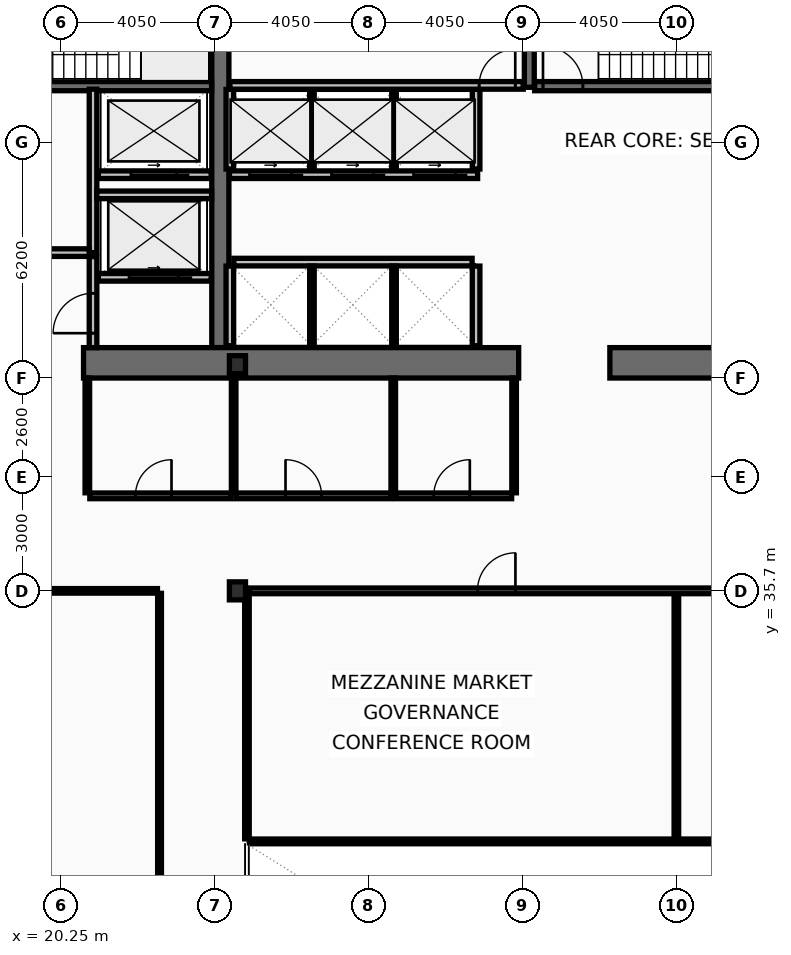
"""IFC4 building model, lengths in metres.
Left out: names, types, materials, properties, quantities, classifications, styles, units other than length and angle.
Written with IfcOpenShell. Run it as: python <this file> out.ifc"""

import sys

from ifc_helpers import new_model, si_unit, direction, frame, frame_2d, origin, origin_2d, place, context, subcontext, project, spatial, rectangle, i_section, extrude, element, fill, save


model = new_model("IFC4")
c1 = context("Model", 3, precision=1e-05, world=origin(), true_north=direction((0.0, 1.0)))
c2 = subcontext(c1, "Body", "Model", "MODEL_VIEW")
j1 = project(units=[si_unit("LENGTHUNIT", "METRE"), si_unit("PLANEANGLEUNIT", "RADIAN")], contexts=[c1])
p1 = place(None, origin())
s1 = spatial("IfcSite", under=j1, at=p1, CompositionType="ELEMENT")
p2 = place(p1, origin())
s2 = spatial("IfcBuilding", under=s1, at=p2, CompositionType="ELEMENT")
p3 = place(p2, frame((0.0, 0.0, 15.4)))
s3 = spatial("IfcBuildingStorey", under=s2, at=p3, CompositionType="ELEMENT", Elevation=15.4)
p4 = place(p3, frame((24.45, 42.1, 0.0), z_axis=(0.0, 0.0, 1.0), x_axis=(0.0, 1.0, 0.0)))
e1 = element("IfcWall", 1, at=p4, inside=s3, PredefinedType="SHEAR", context=c2, shape_type="SweptSolid", body=[
    extrude(rectangle(XDim=10.8, YDim=0.45, at=frame_2d((5.4, 0.0))), origin(), (0.0, 0.0, 1.0), 4.78),
])
p5 = place(p3, frame((32.3, 41.7, 0.0), z_axis=(0.0, 0.0, 1.0), x_axis=(-1.0, 0.0, 0.0)))
e2 = element("IfcWall", 2, at=p5, inside=s3, PredefinedType="SHEAR", context=c2, shape_type="SweptSolid", body=[
    extrude(rectangle(XDim=11.45, YDim=0.8, at=frame_2d((5.725, 0.0))), origin(), (0.0, 0.0, 1.0), 4.78),
])
p6 = place(p3, frame((38.45, 41.7, 0.0), z_axis=(0.0, 0.0, 1.0), x_axis=(-1.0, 0.0, 0.0)))
e3 = element("IfcWall", 3, at=p6, inside=s3, PredefinedType="SHEAR", context=c2, shape_type="SweptSolid", body=[
    extrude(rectangle(XDim=3.75, YDim=0.8, at=frame_2d((1.875, 0.0))), origin(), (0.0, 0.0, 1.0), 4.78),
])
p7 = place(p3, frame((32.58, 48.95, 0.0), z_axis=(0.0, 0.0, 1.0), x_axis=(0.0, 1.0, 0.0)))
e4 = element("IfcWall", 4, at=p7, inside=s3, PredefinedType="SHEAR", context=c2, shape_type="SweptSolid", body=[
    extrude(rectangle(XDim=3.95, YDim=0.26, at=frame_2d((1.975, 0.0))), origin(), (0.0, 0.0, 1.0), 4.78),
])
p8 = place(p3, frame((17.0, 48.98, 0.0), z_axis=(0.0, 0.0, 1.0), x_axis=(1.0, 0.0, 0.0)))
e5 = element("IfcWall", 5, at=p8, inside=s3, PredefinedType="SHEAR", context=c2, shape_type="SweptSolid", body=[
    extrude(rectangle(XDim=7.22, YDim=0.24, at=frame_2d((3.61, 0.0))), origin(), (0.0, 0.0, 1.0), 4.78),
])
p9 = place(p8, frame((0.22, 0.0, 0.0)))
e6 = element("IfcOpeningElement", 6, at=p9, cuts=e5, PredefinedType="OPENING", context=c2, shape_type="SweptSolid", body=[
    extrude(rectangle(XDim=1.05, YDim=2.15, at=frame_2d((0.525, 1.075))), frame((0.0, 0.13, 0.0), z_axis=(0.0, -1.0, 0.0), x_axis=(1.0, 0.0, 0.0)), (0.0, 0.0, 1.0), 0.26),
])
p10 = place(p3, frame((32.72, 48.98, 0.0), z_axis=(0.0, 0.0, 1.0), x_axis=(1.0, 0.0, 0.0)))
e7 = element("IfcWall", 7, at=p10, inside=s3, PredefinedType="SHEAR", context=c2, shape_type="SweptSolid", body=[
    extrude(rectangle(XDim=7.56, YDim=0.24, at=frame_2d((3.78, 0.0))), origin(), (0.0, 0.0, 1.0), 4.78),
])
p11 = place(p10, frame((0.22, 0.0, 0.0)))
e8 = element("IfcOpeningElement", 8, at=p11, cuts=e7, PredefinedType="OPENING", context=c2, shape_type="SweptSolid", body=[
    extrude(rectangle(XDim=1.05, YDim=2.15, at=frame_2d((0.525, 1.075))), frame((0.0, 0.13, 0.0), z_axis=(0.0, -1.0, 0.0), x_axis=(1.0, 0.0, 0.0)), (0.0, 0.0, 1.0), 0.26),
])
for number, where, z_axis, x_axis in (
    (9, (24.9, 35.7, 0.0), (0.0, 0.0, 1.0), (1.0, 0.0, 0.0)),
    (10, (24.9, 41.65, 0.0), (0.0, 0.0, 1.0), (1.0, 0.0, 0.0)),
):
    element("IfcColumn", number, at=place(p3, frame(where, z_axis=z_axis, x_axis=x_axis)), inside=s3, PredefinedType="COLUMN", context=c2, shape_type="SweptSolid", body=[
        extrude(i_section(OverallWidth=0.424, OverallDepth=0.474, WebThickness=0.048, FlangeThickness=0.077, at=origin_2d()), origin(), (0.0, 0.0, 1.0), 5.0),
    ])
p12 = place(p3, frame((24.21, 43.95, 0.0), z_axis=(0.0, 0.0, 1.0), x_axis=(-1.0, 0.0, 0.0)))
e11 = element("IfcWall", 11, at=p12, inside=s3, PredefinedType="PARTITIONING", context=c2, shape_type="SweptSolid", body=[
    extrude(rectangle(XDim=2.97, YDim=0.2, at=frame_2d((1.485, 0.0))), origin(), (0.0, 0.0, 1.0), 4.78),
])
p13 = place(p12, frame((0.86, 0.0, 0.0)))
e12 = element("IfcOpeningElement", 12, at=p13, cuts=e11, PredefinedType="OPENING", context=c2, shape_type="SweptSolid", body=[
    extrude(rectangle(XDim=1.3, YDim=2.18, at=frame_2d((0.65, 1.09))), frame((0.0, 0.11, 0.0), z_axis=(0.0, -1.0, 0.0), x_axis=(1.0, 0.0, 0.0)), (0.0, 0.0, 1.0), 0.22),
])
p14 = place(p3, frame((24.21, 46.65, 0.0), z_axis=(0.0, 0.0, 1.0), x_axis=(-1.0, 0.0, 0.0)))
e13 = element("IfcWall", 13, at=p14, inside=s3, PredefinedType="PARTITIONING", context=c2, shape_type="SweptSolid", body=[
    extrude(rectangle(XDim=2.97, YDim=0.2, at=frame_2d((1.485, 0.0))), origin(), (0.0, 0.0, 1.0), 4.78),
])
p15 = place(p14, frame((0.91, 0.0, 0.0)))
e14 = element("IfcOpeningElement", 14, at=p15, cuts=e13, PredefinedType="OPENING", context=c2, shape_type="SweptSolid", body=[
    extrude(rectangle(XDim=1.2, YDim=2.18, at=frame_2d((0.6, 1.09))), frame((0.0, 0.11, 0.0), z_axis=(0.0, -1.0, 0.0), x_axis=(1.0, 0.0, 0.0)), (0.0, 0.0, 1.0), 0.22),
])
p16 = place(p3, frame((31.22, 46.65, 0.0), z_axis=(0.0, 0.0, 1.0), x_axis=(-1.0, 0.0, 0.0)))
e15 = element("IfcWall", 15, at=p16, inside=s3, PredefinedType="PARTITIONING", context=c2, shape_type="SweptSolid", body=[
    extrude(rectangle(XDim=6.53, YDim=0.2, at=frame_2d((3.265, 0.0))), origin(), (0.0, 0.0, 1.0), 4.78),
])
p17 = place(p16, frame((4.9, 0.0, 0.0)))
e16 = element("IfcOpeningElement", 16, at=p17, cuts=e15, PredefinedType="OPENING", context=c2, shape_type="SweptSolid", body=[
    extrude(rectangle(XDim=1.1, YDim=2.18, at=frame_2d((0.55, 1.09))), frame((0.0, 0.11, 0.0), z_axis=(0.0, -1.0, 0.0), x_axis=(1.0, 0.0, 0.0)), (0.0, 0.0, 1.0), 0.22),
])
p18 = place(p16, frame((2.74, 0.0, 0.0)))
e17 = element("IfcOpeningElement", 17, at=p18, cuts=e15, PredefinedType="OPENING", context=c2, shape_type="SweptSolid", body=[
    extrude(rectangle(XDim=1.1, YDim=2.18, at=frame_2d((0.55, 1.09))), frame((0.0, 0.11, 0.0), z_axis=(0.0, -1.0, 0.0), x_axis=(1.0, 0.0, 0.0)), (0.0, 0.0, 1.0), 0.22),
])
p19 = place(p16, frame((0.58, 0.0, 0.0)))
e18 = element("IfcOpeningElement", 18, at=p19, cuts=e15, PredefinedType="OPENING", context=c2, shape_type="SweptSolid", body=[
    extrude(rectangle(XDim=1.1, YDim=2.18, at=frame_2d((0.55, 1.09))), frame((0.0, 0.11, 0.0), z_axis=(0.0, -1.0, 0.0), x_axis=(1.0, 0.0, 0.0)), (0.0, 0.0, 1.0), 0.22),
])
p20 = place(p3, frame((21.1, 44.6, 0.0), z_axis=(0.0, 0.0, 1.0), x_axis=(0.0, 1.0, 0.0)))
e19 = element("IfcWall", 19, at=p20, inside=s3, PredefinedType="PARTITIONING", context=c2, shape_type="SweptSolid", body=[
    extrude(rectangle(XDim=4.3, YDim=0.2, at=frame_2d((2.15, 0.0))), origin(), (0.0, 0.0, 1.0), 4.78),
])
p21 = place(p3, frame((17.0, 44.6, 0.0), z_axis=(0.0, 0.0, 1.0), x_axis=(1.0, 0.0, 0.0)))
e20 = element("IfcWall", 20, at=p21, inside=s3, PredefinedType="PARTITIONING", context=c2, shape_type="SweptSolid", body=[
    extrude(rectangle(XDim=4.0, YDim=0.2, at=frame_2d((2.0, 0.0))), origin(), (0.0, 0.0, 1.0), 4.78),
])
p22 = place(p21, frame((1.25, 0.0, 0.0)))
e21 = element("IfcOpeningElement", 21, at=p22, cuts=e20, PredefinedType="OPENING", context=c2, shape_type="SweptSolid", body=[
    extrude(rectangle(XDim=1.05, YDim=2.15, at=frame_2d((0.525, 1.075))), frame((0.0, 0.11, 0.0), z_axis=(0.0, -1.0, 0.0), x_axis=(1.0, 0.0, 0.0)), (0.0, 0.0, 1.0), 0.22),
])
p23 = place(p3, frame((21.2, 46.12, 0.0), z_axis=(0.0, 0.0, 1.0), x_axis=(1.0, 0.0, 0.0)))
e22 = element("IfcWall", 22, at=p23, inside=s3, PredefinedType="PARTITIONING", context=c2, shape_type="SweptSolid", body=[
    extrude(rectangle(XDim=3.02, YDim=0.2, at=frame_2d((1.51, 0.0))), origin(), (0.0, 0.0, 1.0), 4.78),
])
p24 = place(p3, frame((21.1, 42.1, 0.0), z_axis=(0.0, 0.0, 1.0), x_axis=(0.0, 1.0, 0.0)))
e23 = element("IfcWall", 23, at=p24, inside=s3, PredefinedType="PARTITIONING", context=c2, shape_type="SweptSolid", body=[
    extrude(rectangle(XDim=2.395, YDim=0.2, at=frame_2d((1.198, 0.0))), origin(), (0.0, 0.0, 1.0), 4.78),
])
p25 = place(p24, frame((0.38, 0.0, 0.0)))
e24 = element("IfcOpeningElement", 24, at=p25, cuts=e23, PredefinedType="OPENING", context=c2, shape_type="SweptSolid", body=[
    extrude(rectangle(XDim=1.05, YDim=2.15, at=frame_2d((0.525, 1.075))), frame((0.0, 0.11, 0.0), z_axis=(0.0, -1.0, 0.0), x_axis=(1.0, 0.0, 0.0)), (0.0, 0.0, 1.0), 0.22),
])
for number, where, z_axis, x_axis in (
    (25, (24.7, 46.8, 0.0), (0.0, 0.0, 1.0), (0.0, 1.0, 0.0)),
    (26, (31.18, 46.8, 0.0), (0.0, 0.0, 1.0), (0.0, 1.0, 0.0)),
):
    element("IfcWall", number, at=place(p3, frame(where, z_axis=z_axis, x_axis=x_axis)), inside=s3, PredefinedType="PARTITIONING", context=c2, shape_type="SweptSolid", body=[
        extrude(rectangle(XDim=2.095, YDim=0.2, at=frame_2d((1.047, 0.0))), origin(), (0.0, 0.0, 1.0), 4.78),
    ])
for number, where, z_axis, x_axis in (
    (27, (26.86, 46.8, 0.0), (0.0, 0.0, 1.0), (0.0, 1.0, 0.0)),
    (28, (29.02, 46.8, 0.0), (0.0, 0.0, 1.0), (0.0, 1.0, 0.0)),
):
    element("IfcWall", number, at=place(p3, frame(where, z_axis=z_axis, x_axis=x_axis)), inside=s3, PredefinedType="PARTITIONING", context=c2, shape_type="SweptSolid", body=[
        extrude(rectangle(XDim=2.095, YDim=0.12, at=frame_2d((1.047, 0.0))), origin(), (0.0, 0.0, 1.0), 4.78),
    ])
p26 = place(p3, frame((24.805, 44.35, 0.0), z_axis=(0.0, 0.0, 1.0), x_axis=(1.0, 0.0, 0.0)))
e29 = element("IfcWall", 29, at=p26, inside=s3, PredefinedType="PARTITIONING", context=c2, shape_type="SweptSolid", body=[
    extrude(rectangle(XDim=6.27, YDim=0.2, at=frame_2d((3.135, 0.0))), origin(), (0.0, 0.0, 1.0), 4.78),
])
for number, where, z_axis, x_axis in (
    (30, (24.7, 42.15, 0.0), (0.0, 0.0, 1.0), (0.0, 1.0, 0.0)),
    (31, (31.18, 42.15, 0.0), (0.0, 0.0, 1.0), (0.0, 1.0, 0.0)),
):
    element("IfcWall", number, at=place(p3, frame(where, z_axis=z_axis, x_axis=x_axis)), inside=s3, PredefinedType="PARTITIONING", context=c2, shape_type="SweptSolid", body=[
        extrude(rectangle(XDim=2.095, YDim=0.2, at=frame_2d((1.048, 0.0))), origin(), (0.0, 0.0, 1.0), 4.78),
    ])
for number, where, z_axis, x_axis in (
    (32, (26.86, 42.15, 0.0), (0.0, 0.0, 1.0), (0.0, 1.0, 0.0)),
    (33, (29.02, 42.15, 0.0), (0.0, 0.0, 1.0), (0.0, 1.0, 0.0)),
):
    element("IfcWall", number, at=place(p3, frame(where, z_axis=z_axis, x_axis=x_axis)), inside=s3, PredefinedType="PARTITIONING", context=c2, shape_type="SweptSolid", body=[
        extrude(rectangle(XDim=2.095, YDim=0.12, at=frame_2d((1.048, 0.0))), origin(), (0.0, 0.0, 1.0), 4.78),
    ])
p27 = place(p3, frame((24.7, 49.0, 0.0), z_axis=(0.0, 0.0, 1.0), x_axis=(1.0, 0.0, 0.0)))
e34 = element("IfcWall", 34, at=p27, inside=s3, PredefinedType="PARTITIONING", context=c2, shape_type="SweptSolid", body=[
    extrude(rectangle(XDim=7.72, YDim=0.2, at=frame_2d((3.86, 0.0))), origin(), (0.0, 0.0, 1.0), 4.78),
])
p28 = place(p27, frame((6.56, 0.0, 0.0)))
e35 = element("IfcOpeningElement", 35, at=p28, cuts=e34, PredefinedType="OPENING", context=c2, shape_type="SweptSolid", body=[
    extrude(rectangle(XDim=0.95, YDim=2.1, at=frame_2d((0.475, 1.05))), frame((0.0, 0.11, 0.0), z_axis=(0.0, -1.0, 0.0), x_axis=(1.0, 0.0, 0.0)), (0.0, 0.0, 1.0), 0.22),
])
p29 = place(p3, frame((25.215, 29.12, 0.0), z_axis=(0.0, 0.0, 1.0), x_axis=(1.0, 0.0, 0.0)))
e36 = element("IfcWall", 36, at=p29, inside=s3, PredefinedType="MOVABLE", context=c2, shape_type="SweptSolid", body=[
    extrude(rectangle(XDim=22.47, YDim=0.1, at=frame_2d((11.235, 0.0))), origin(), (0.0, 0.0, 1.0), 3.87),
])
p30 = place(p3, frame((36.45, 29.175, 0.0), z_axis=(0.0, 0.0, 1.0), x_axis=(0.0, 1.0, 0.0)))
e37 = element("IfcWall", 37, at=p30, inside=s3, PredefinedType="PARTITIONING", context=c2, shape_type="SweptSolid", body=[
    extrude(rectangle(XDim=6.445, YDim=0.12, at=frame_2d((3.223, 0.0))), origin(), (0.0, 0.0, 1.0), 4.17),
])
p31 = place(p3, frame((25.215, 35.7, 0.0), z_axis=(0.0, 0.0, 1.0), x_axis=(1.0, 0.0, 0.0)))
e38 = element("IfcWall", 38, at=p31, inside=s3, PredefinedType="PARTITIONING", context=c2, shape_type="SweptSolid", body=[
    extrude(rectangle(XDim=22.47, YDim=0.15, at=frame_2d((11.235, 0.0))), origin(), (0.0, 0.0, 1.0), 3.87),
])
p32 = place(p31, frame((6.0, 0.0, 0.0)))
e39 = element("IfcOpeningElement", 39, at=p32, cuts=e38, PredefinedType="OPENING", context=c2, shape_type="SweptSolid", body=[
    extrude(rectangle(XDim=1.0, YDim=2.05, at=frame_2d((0.5, 1.025))), frame((0.0, 0.085, 0.0), z_axis=(0.0, -1.0, 0.0), x_axis=(1.0, 0.0, 0.0)), (0.0, 0.0, 1.0), 0.17),
])
p33 = place(p31, frame((18.5, 0.0, 0.0)))
e40 = element("IfcOpeningElement", 40, at=p33, cuts=e38, PredefinedType="OPENING", context=c2, shape_type="SweptSolid", body=[
    extrude(rectangle(XDim=1.0, YDim=2.05, at=frame_2d((0.5, 1.025))), frame((0.0, 0.085, 0.0), z_axis=(0.0, -1.0, 0.0), x_axis=(1.0, 0.0, 0.0)), (0.0, 0.0, 1.0), 0.17),
])
p34 = place(p3, frame((25.15, 29.175, 0.0), z_axis=(0.0, 0.0, 1.0), x_axis=(0.0, 1.0, 0.0)))
e41 = element("IfcWall", 41, at=p34, inside=s3, PredefinedType="PARTITIONING", context=c2, shape_type="SweptSolid", body=[
    extrude(rectangle(XDim=6.445, YDim=0.12, at=frame_2d((3.223, 0.0))), origin(), (0.0, 0.0, 1.0), 3.87),
])
p35 = place(p3, frame((21.015, 38.2, 0.0), z_axis=(0.0, 0.0, 1.0), x_axis=(1.0, 0.0, 0.0)))
e42 = element("IfcWall", 42, at=p35, inside=s3, PredefinedType="PARTITIONING", context=c2, shape_type="SweptSolid", body=[
    extrude(rectangle(XDim=3.72, YDim=0.15, at=frame_2d((1.86, 0.0))), origin(), (0.0, 0.0, 1.0), 3.87),
])
p36 = place(p35, frame((1.2, 0.0, 0.0)))
e43 = element("IfcOpeningElement", 43, at=p36, cuts=e42, PredefinedType="OPENING", context=c2, shape_type="SweptSolid", body=[
    extrude(rectangle(XDim=0.95, YDim=2.05, at=frame_2d((0.475, 1.025))), frame((0.0, 0.085, 0.0), z_axis=(0.0, -1.0, 0.0), x_axis=(1.0, 0.0, 0.0)), (0.0, 0.0, 1.0), 0.17),
])
p37 = place(p3, frame((24.865, 38.2, 0.0), z_axis=(0.0, 0.0, 1.0), x_axis=(1.0, 0.0, 0.0)))
e44 = element("IfcWall", 44, at=p37, inside=s3, PredefinedType="PARTITIONING", context=c2, shape_type="SweptSolid", body=[
    extrude(rectangle(XDim=4.07, YDim=0.15, at=frame_2d((2.035, 0.0))), origin(), (0.0, 0.0, 1.0), 3.87),
])
p38 = place(p37, frame((1.3, 0.0, 0.0)))
e45 = element("IfcOpeningElement", 45, at=p38, cuts=e44, PredefinedType="OPENING", context=c2, shape_type="SweptSolid", body=[
    extrude(rectangle(XDim=0.95, YDim=2.05, at=frame_2d((0.475, 1.025))), frame((0.0, 0.085, 0.0), z_axis=(0.0, -1.0, 0.0), x_axis=(1.0, 0.0, 0.0)), (0.0, 0.0, 1.0), 0.17),
])
p39 = place(p3, frame((29.065, 38.2, 0.0), z_axis=(0.0, 0.0, 1.0), x_axis=(1.0, 0.0, 0.0)))
e46 = element("IfcWall", 46, at=p39, inside=s3, PredefinedType="PARTITIONING", context=c2, shape_type="SweptSolid", body=[
    extrude(rectangle(XDim=3.05, YDim=0.15, at=frame_2d((1.525, 0.0))), origin(), (0.0, 0.0, 1.0), 3.87),
])
p40 = place(p39, frame((1.0, 0.0, 0.0)))
e47 = element("IfcOpeningElement", 47, at=p40, cuts=e46, PredefinedType="OPENING", context=c2, shape_type="SweptSolid", body=[
    extrude(rectangle(XDim=0.95, YDim=2.05, at=frame_2d((0.475, 1.025))), frame((0.0, 0.085, 0.0), z_axis=(0.0, -1.0, 0.0), x_axis=(1.0, 0.0, 0.0)), (0.0, 0.0, 1.0), 0.17),
])
p41 = place(p3, frame((20.95, 38.28, 0.0), z_axis=(0.0, 0.0, 1.0), x_axis=(0.0, 1.0, 0.0)))
e48 = element("IfcWall", 48, at=p41, inside=s3, PredefinedType="PARTITIONING", context=c2, shape_type="SweptSolid", body=[
    extrude(rectangle(XDim=3.02, YDim=0.12, at=frame_2d((1.51, 0.0))), origin(), (0.0, 0.0, 1.0), 4.78),
])
p42 = place(p3, frame((24.8, 38.28, 0.0), z_axis=(0.0, 0.0, 1.0), x_axis=(0.0, 1.0, 0.0)))
e49 = element("IfcWall", 49, at=p42, inside=s3, PredefinedType="PARTITIONING", context=c2, shape_type="SweptSolid", body=[
    extrude(rectangle(XDim=3.02, YDim=0.12, at=frame_2d((1.51, 0.0))), origin(), (0.0, 0.0, 1.0), 3.87),
])
for number, where, z_axis, x_axis in (
    (50, (29.0, 38.28, 0.0), (0.0, 0.0, 1.0), (0.0, 1.0, 0.0)),
    (51, (32.18, 38.28, 0.0), (0.0, 0.0, 1.0), (0.0, 1.0, 0.0)),
):
    element("IfcWall", number, at=place(p3, frame(where, z_axis=z_axis, x_axis=x_axis)), inside=s3, PredefinedType="PARTITIONING", context=c2, shape_type="SweptSolid", body=[
        extrude(rectangle(XDim=3.02, YDim=0.12, at=frame_2d((1.51, 0.0))), origin(), (0.0, 0.0, 1.0), 4.78),
    ])
p43 = place(p3, frame((22.85, 14.965, 0.0), z_axis=(0.0, 0.0, 1.0), x_axis=(0.0, 1.0, 0.0)))
e52 = element("IfcWall", 52, at=p43, inside=s3, PredefinedType="MOVABLE", context=c2, shape_type="SweptSolid", body=[
    extrude(rectangle(XDim=20.67, YDim=0.1, at=frame_2d((10.335, 0.0))), origin(), (0.0, 0.0, 1.0), 4.17),
])
p44 = place(p43, frame((6.5, 0.0, 0.0)))
e53 = element("IfcOpeningElement", 53, at=p44, cuts=e52, PredefinedType="OPENING", context=c2, shape_type="SweptSolid", body=[
    extrude(rectangle(XDim=1.0, YDim=2.05, at=frame_2d((0.5, 1.025))), frame((0.0, 0.06, 0.0), z_axis=(0.0, -1.0, 0.0), x_axis=(1.0, 0.0, 0.0)), (0.0, 0.0, 1.0), 0.12),
])
p45 = place(p3, frame((16.24, 35.7, 0.0), z_axis=(0.0, 0.0, 1.0), x_axis=(1.0, 0.0, 0.0)))
e54 = element("IfcWall", 54, at=p45, inside=s3, PredefinedType="PARTITIONING", context=c2, shape_type="SweptSolid", body=[
    extrude(rectangle(XDim=6.555, YDim=0.12, at=frame_2d((3.277, 0.0))), origin(), (0.0, 0.0, 1.0), 3.87),
])
p46 = place(p11, origin())
e55 = element("IfcDoor", 55, at=p46, inside=s3, OperationType="SINGLE_SWING_LEFT", PredefinedType="DOOR", context=c2, shape_type="SweptSolid", body=[
    extrude(rectangle(XDim=1.05, YDim=2.15, at=frame_2d((0.525, 1.075))), frame((0.0, 0.025, 0.0), z_axis=(0.0, -1.0, 0.0), x_axis=(1.0, 0.0, 0.0)), (0.0, 0.0, 1.0), 0.05),
])
fill(e8, e55)
p47 = place(p13, origin())
e56 = element("IfcDoor", 56, at=p47, inside=s3, OperationType="SLIDING_TO_LEFT", PredefinedType="DOOR", context=c2, shape_type="SweptSolid", body=[
    extrude(rectangle(XDim=1.3, YDim=2.18, at=frame_2d((0.65, 1.09))), frame((0.0, 0.025, 0.0), z_axis=(0.0, -1.0, 0.0), x_axis=(1.0, 0.0, 0.0)), (0.0, 0.0, 1.0), 0.05),
])
fill(e12, e56)
p48 = place(p15, origin())
e57 = element("IfcDoor", 57, at=p48, inside=s3, OperationType="SLIDING_TO_LEFT", PredefinedType="DOOR", context=c2, shape_type="SweptSolid", body=[
    extrude(rectangle(XDim=1.2, YDim=2.18, at=frame_2d((0.6, 1.09))), frame((0.0, 0.025, 0.0), z_axis=(0.0, -1.0, 0.0), x_axis=(1.0, 0.0, 0.0)), (0.0, 0.0, 1.0), 0.05),
])
fill(e14, e57)
p49 = place(p17, origin())
e58 = element("IfcDoor", 58, at=p49, inside=s3, OperationType="SLIDING_TO_LEFT", PredefinedType="DOOR", context=c2, shape_type="SweptSolid", body=[
    extrude(rectangle(XDim=1.1, YDim=2.18, at=frame_2d((0.55, 1.09))), frame((0.0, 0.025, 0.0), z_axis=(0.0, -1.0, 0.0), x_axis=(1.0, 0.0, 0.0)), (0.0, 0.0, 1.0), 0.05),
])
fill(e16, e58)
p50 = place(p18, origin())
e59 = element("IfcDoor", 59, at=p50, inside=s3, OperationType="SLIDING_TO_LEFT", PredefinedType="DOOR", context=c2, shape_type="SweptSolid", body=[
    extrude(rectangle(XDim=1.1, YDim=2.18, at=frame_2d((0.55, 1.09))), frame((0.0, 0.025, 0.0), z_axis=(0.0, -1.0, 0.0), x_axis=(1.0, 0.0, 0.0)), (0.0, 0.0, 1.0), 0.05),
])
fill(e17, e59)
p51 = place(p19, origin())
e60 = element("IfcDoor", 60, at=p51, inside=s3, OperationType="SLIDING_TO_LEFT", PredefinedType="DOOR", context=c2, shape_type="SweptSolid", body=[
    extrude(rectangle(XDim=1.1, YDim=2.18, at=frame_2d((0.55, 1.09))), frame((0.0, 0.025, 0.0), z_axis=(0.0, -1.0, 0.0), x_axis=(1.0, 0.0, 0.0)), (0.0, 0.0, 1.0), 0.05),
])
fill(e18, e60)
p52 = place(p25, origin())
e61 = element("IfcDoor", 61, at=p52, inside=s3, OperationType="SINGLE_SWING_LEFT", PredefinedType="DOOR", context=c2, shape_type="SweptSolid", body=[
    extrude(rectangle(XDim=1.05, YDim=2.15, at=frame_2d((0.525, 1.075))), frame((0.0, 0.025, 0.0), z_axis=(0.0, -1.0, 0.0), x_axis=(1.0, 0.0, 0.0)), (0.0, 0.0, 1.0), 0.05),
])
fill(e24, e61)
p53 = place(p28, origin())
e62 = element("IfcDoor", 62, at=p53, inside=s3, OperationType="SINGLE_SWING_RIGHT", PredefinedType="DOOR", context=c2, shape_type="SweptSolid", body=[
    extrude(rectangle(XDim=0.95, YDim=2.1, at=frame_2d((0.475, 1.05))), frame((0.0, 0.025, 0.0), z_axis=(0.0, -1.0, 0.0), x_axis=(1.0, 0.0, 0.0)), (0.0, 0.0, 1.0), 0.05),
])
fill(e35, e62)
p54 = place(p32, origin())
e63 = element("IfcDoor", 63, at=p54, inside=s3, OperationType="SINGLE_SWING_RIGHT", PredefinedType="DOOR", context=c2, shape_type="SweptSolid", body=[
    extrude(rectangle(XDim=1.0, YDim=2.05, at=frame_2d((0.5, 1.025))), frame((0.0, 0.025, 0.0), z_axis=(0.0, -1.0, 0.0), x_axis=(1.0, 0.0, 0.0)), (0.0, 0.0, 1.0), 0.05),
])
fill(e39, e63)
p55 = place(p36, origin())
e64 = element("IfcDoor", 64, at=p55, inside=s3, OperationType="SINGLE_SWING_RIGHT", PredefinedType="DOOR", context=c2, shape_type="SweptSolid", body=[
    extrude(rectangle(XDim=0.95, YDim=2.05, at=frame_2d((0.475, 1.025))), frame((0.0, 0.025, 0.0), z_axis=(0.0, -1.0, 0.0), x_axis=(1.0, 0.0, 0.0)), (0.0, 0.0, 1.0), 0.05),
])
fill(e43, e64)
p56 = place(p38, origin())
e65 = element("IfcDoor", 65, at=p56, inside=s3, OperationType="SINGLE_SWING_LEFT", PredefinedType="DOOR", context=c2, shape_type="SweptSolid", body=[
    extrude(rectangle(XDim=0.95, YDim=2.05, at=frame_2d((0.475, 1.025))), frame((0.0, 0.025, 0.0), z_axis=(0.0, -1.0, 0.0), x_axis=(1.0, 0.0, 0.0)), (0.0, 0.0, 1.0), 0.05),
])
fill(e45, e65)
p57 = place(p40, origin())
e66 = element("IfcDoor", 66, at=p57, inside=s3, OperationType="SINGLE_SWING_RIGHT", PredefinedType="DOOR", context=c2, shape_type="SweptSolid", body=[
    extrude(rectangle(XDim=0.95, YDim=2.05, at=frame_2d((0.475, 1.025))), frame((0.0, 0.025, 0.0), z_axis=(0.0, -1.0, 0.0), x_axis=(1.0, 0.0, 0.0)), (0.0, 0.0, 1.0), 0.05),
])
fill(e47, e66)
save(model, sys.argv[1])
